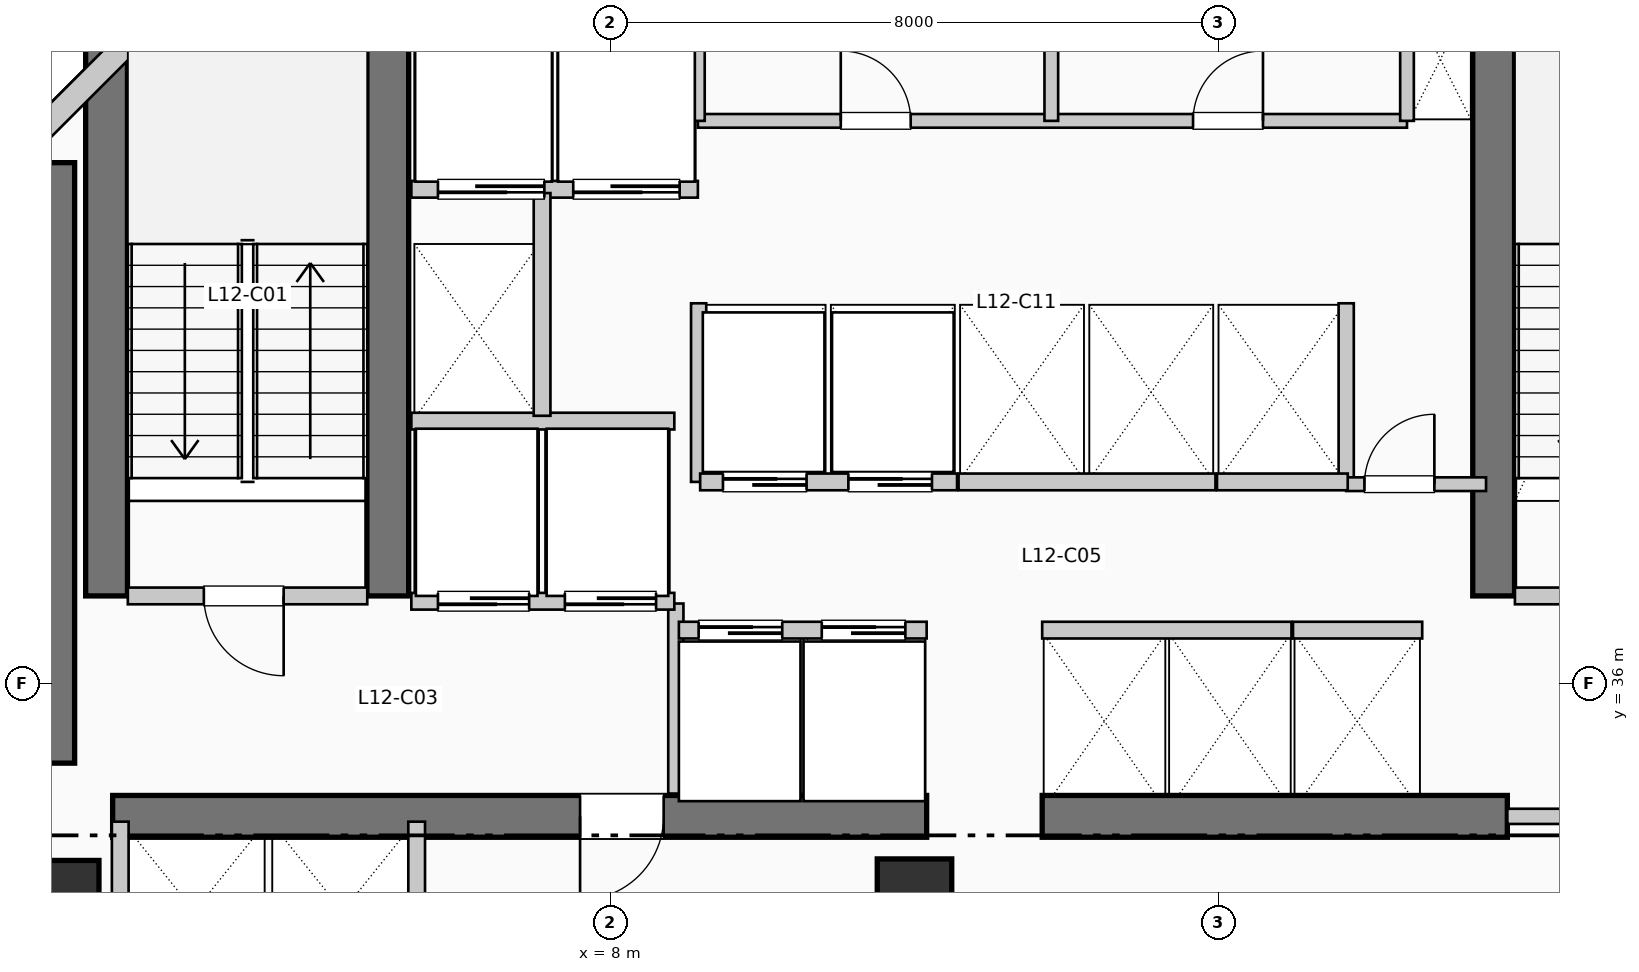
"""IFC4 building model, lengths in metres.
Left out: names, types, materials, properties, quantities, classifications, styles, units other than length and angle.
Written with IfcOpenShell. Run it as: python <this file> out.ifc"""

import sys

from ifc_helpers import new_model, si_unit, direction, frame, frame_2d, origin, origin_2d, place, context, subcontext, project, spatial, rectangle, extrude, element, fill, save


model = new_model("IFC4")
c1 = context("Model", 3, precision=1e-05, world=origin(), true_north=direction((0.0, 1.0)))
c2 = subcontext(c1, "Body", "Model", "MODEL_VIEW")
j1 = project(units=[si_unit("LENGTHUNIT", "METRE"), si_unit("PLANEANGLEUNIT", "RADIAN")], contexts=[c1])
p1 = place(None, origin())
s1 = spatial("IfcSite", under=j1, at=p1, CompositionType="ELEMENT")
p2 = place(p1, origin())
s2 = spatial("IfcBuilding", under=s1, at=p2, CompositionType="ELEMENT")
p3 = place(p2, frame((0.0, 0.0, 54.12)))
s3 = spatial("IfcBuildingStorey", under=s2, at=p3, CompositionType="ELEMENT", Elevation=54.12)
p4 = place(p3, frame((0.5, 34.95, 0.0), z_axis=(0.0, 0.0, 1.0), x_axis=(0.0, 1.0, 0.0)))
e1 = element("IfcWall", 1, at=p4, inside=s3, PredefinedType="SHEAR", context=c2, shape_type="SweptSolid", body=[
    extrude(rectangle(XDim=7.9, YDim=0.9, at=frame_2d((3.95, 0.0))), origin(), (0.0, 0.0, 1.0), 3.96),
])
p5 = place(p3, frame((1.45, 34.25, 0.0), z_axis=(0.0, 0.0, 1.0), x_axis=(1.0, 0.0, 0.0)))
e2 = element("IfcWall", 2, at=p5, inside=s3, PredefinedType="SHEAR", context=c2, shape_type="SweptSolid", body=[
    extrude(rectangle(XDim=10.71, YDim=0.55, at=frame_2d((5.355, 0.0))), origin(), (0.0, 0.0, 1.0), 3.96),
])
p6 = place(p5, frame((7.25, 0.0, 0.0), z_axis=(0.0, 0.0, 1.0), x_axis=(-1.0, 0.0, 0.0)))
e3 = element("IfcOpeningElement", 3, at=p6, cuts=e2, PredefinedType="OPENING", context=c2, shape_type="SweptSolid", body=[
    extrude(rectangle(XDim=1.1, YDim=2.15, at=frame_2d((0.55, 1.075))), frame((0.0, 0.285, 0.0), z_axis=(0.0, -1.0, 0.0), x_axis=(1.0, 0.0, 0.0)), (0.0, 0.0, 1.0), 0.57),
])
p7 = place(p3, frame((13.68, 34.25, 0.0), z_axis=(0.0, 0.0, 1.0), x_axis=(1.0, 0.0, 0.0)))
e4 = element("IfcWall", 4, at=p7, inside=s3, PredefinedType="SHEAR", context=c2, shape_type="SweptSolid", body=[
    extrude(rectangle(XDim=6.12, YDim=0.55, at=frame_2d((3.06, 0.0))), origin(), (0.0, 0.0, 1.0), 3.96),
])
for number, where, z_axis, x_axis in (
    (5, (1.37, 37.15, 0.0), (0.0, 0.0, 1.0), (0.0, 1.0, 0.0)),
    (6, (5.07, 37.15, 0.0), (0.0, 0.0, 1.0), (0.0, 1.0, 0.0)),
    (7, (19.62, 37.15, 0.0), (0.0, 0.0, 1.0), (0.0, 1.0, 0.0)),
):
    element("IfcWall", number, at=place(p3, frame(where, z_axis=z_axis, x_axis=x_axis)), inside=s3, PredefinedType="SHEAR", context=c2, shape_type="SweptSolid", body=[
        extrude(rectangle(XDim=7.89, YDim=0.55, at=frame_2d((3.945, 0.0))), origin(), (0.0, 0.0, 1.0), 3.96),
    ])
p8 = place(p3, frame((0.8, 33.2, 0.0), z_axis=(0.0, 0.0, 1.0), x_axis=(1.0, 0.0, 0.0)))
e8 = element("IfcColumn", 8, at=p8, inside=s3, PredefinedType="COLUMN", context=c2, shape_type="SweptSolid", body=[
    extrude(rectangle(XDim=0.94, YDim=0.94, at=origin_2d()), origin(), (0.0, 0.0, 1.0), 3.96),
])
p9 = place(p3, frame((12.0, 33.2, 0.0), z_axis=(0.0, 0.0, 1.0), x_axis=(1.0, 0.0, 0.0)))
e9 = element("IfcColumn", 9, at=p9, inside=s3, PredefinedType="COLUMN", context=c2, shape_type="SweptSolid", body=[
    extrude(rectangle(XDim=0.98, YDim=0.98, at=origin_2d()), origin(), (0.0, 0.0, 1.0), 3.96),
])
p10 = place(p3, frame((3.074, 45.848, 0.0), z_axis=(0.0, 0.0, 1.0), x_axis=(-0.707106781187, -0.707106781187, 0.0)))
e10 = element("IfcWall", 10, at=p10, inside=s3, PredefinedType="SOLIDWALL", context=c2, shape_type="SweptSolid", body=[
    extrude(rectangle(XDim=4.133, YDim=0.32, at=frame_2d((2.066, 0.0))), origin(), (0.0, 0.0, 1.0), 3.71),
])
p11 = place(p3, frame((1.65, 37.15, 0.0), z_axis=(0.0, 0.0, 1.0), x_axis=(1.0, 0.0, 0.0)))
e11 = element("IfcWall", 11, at=p11, inside=s3, PredefinedType="PARTITIONING", context=c2, shape_type="SweptSolid", body=[
    extrude(rectangle(XDim=3.15, YDim=0.22, at=frame_2d((1.575, 0.0))), origin(), (0.0, 0.0, 1.0), 3.71),
])
p12 = place(p11, frame((2.05, 0.0, 0.0), z_axis=(0.0, 0.0, 1.0), x_axis=(-1.0, 0.0, 0.0)))
e12 = element("IfcOpeningElement", 12, at=p12, cuts=e11, PredefinedType="OPENING", context=c2, shape_type="SweptSolid", body=[
    extrude(rectangle(XDim=1.05, YDim=2.15, at=frame_2d((0.525, 1.075))), frame((0.0, 0.12, 0.0), z_axis=(0.0, -1.0, 0.0), x_axis=(1.0, 0.0, 0.0)), (0.0, 0.0, 1.0), 0.24),
])
p13 = place(p3, frame((8.86, 34.55, 0.0), z_axis=(0.0, 0.0, 1.0), x_axis=(0.0, 1.0, 0.0)))
e13 = element("IfcWall", 13, at=p13, inside=s3, PredefinedType="PARTITIONING", context=c2, shape_type="SweptSolid", body=[
    extrude(rectangle(XDim=2.5, YDim=0.2, at=frame_2d((1.25, 0.0))), origin(), (0.0, 0.0, 1.0), 3.71),
])
p14 = place(p3, frame((19.9, 37.15, 0.0), z_axis=(0.0, 0.0, 1.0), x_axis=(1.0, 0.0, 0.0)))
e14 = element("IfcWall", 14, at=p14, inside=s3, PredefinedType="PARTITIONING", context=c2, shape_type="SweptSolid", body=[
    extrude(rectangle(XDim=3.15, YDim=0.22, at=frame_2d((1.575, 0.0))), origin(), (0.0, 0.0, 1.0), 3.71),
])
p15 = place(p14, frame((2.05, 0.0, 0.0), z_axis=(0.0, 0.0, 1.0), x_axis=(-1.0, 0.0, 0.0)))
e15 = element("IfcOpeningElement", 15, at=p15, cuts=e14, PredefinedType="OPENING", context=c2, shape_type="SweptSolid", body=[
    extrude(rectangle(XDim=1.05, YDim=2.15, at=frame_2d((0.525, 1.075))), frame((0.0, 0.12, 0.0), z_axis=(0.0, -1.0, 0.0), x_axis=(1.0, 0.0, 0.0)), (0.0, 0.0, 1.0), 0.24),
])
p16 = place(p3, frame((19.8, 34.25, 0.0), z_axis=(0.0, 0.0, 1.0), x_axis=(1.0, 0.0, 0.0)))
e16 = element("IfcWall", 16, at=p16, inside=s3, PredefinedType="PARTITIONING", context=c2, shape_type="SweptSolid", body=[
    extrude(rectangle(XDim=3.25, YDim=0.2, at=frame_2d((1.625, 0.0))), origin(), (0.0, 0.0, 1.0), 3.71),
])
p17 = place(p16, frame((2.15, 0.0, 0.0), z_axis=(0.0, 0.0, 1.0), x_axis=(-1.0, 0.0, 0.0)))
e17 = element("IfcOpeningElement", 17, at=p17, cuts=e16, PredefinedType="OPENING", context=c2, shape_type="SweptSolid", body=[
    extrude(rectangle(XDim=1.1, YDim=2.15, at=frame_2d((0.55, 1.075))), frame((0.0, 0.11, 0.0), z_axis=(0.0, -1.0, 0.0), x_axis=(1.0, 0.0, 0.0)), (0.0, 0.0, 1.0), 0.22),
])
p18 = place(p3, frame((5.38, 37.08, 0.0), z_axis=(0.0, 0.0, 1.0), x_axis=(1.0, 0.0, 0.0)))
e18 = element("IfcWall", 18, at=p18, inside=s3, PredefinedType="PARTITIONING", context=c2, shape_type="SweptSolid", body=[
    extrude(rectangle(XDim=3.46, YDim=0.22, at=frame_2d((1.73, 0.0))), origin(), (0.0, 0.0, 1.0), 3.71),
])
p19 = place(p18, frame((1.55, 0.0, 0.0), z_axis=(0.0, 0.0, 1.0), x_axis=(-1.0, 0.0, 0.0)))
e19 = element("IfcOpeningElement", 19, at=p19, cuts=e18, PredefinedType="OPENING", context=c2, shape_type="SweptSolid", body=[
    extrude(rectangle(XDim=1.2, YDim=2.2, at=frame_2d((0.6, 1.1))), frame((0.0, 0.12, 0.0), z_axis=(0.0, -1.0, 0.0), x_axis=(1.0, 0.0, 0.0)), (0.0, 0.0, 1.0), 0.24),
])
p20 = place(p18, frame((3.22, 0.0, 0.0), z_axis=(0.0, 0.0, 1.0), x_axis=(-1.0, 0.0, 0.0)))
e20 = element("IfcOpeningElement", 20, at=p20, cuts=e18, PredefinedType="OPENING", context=c2, shape_type="SweptSolid", body=[
    extrude(rectangle(XDim=1.2, YDim=2.2, at=frame_2d((0.6, 1.1))), frame((0.0, 0.12, 0.0), z_axis=(0.0, -1.0, 0.0), x_axis=(1.0, 0.0, 0.0)), (0.0, 0.0, 1.0), 0.24),
])
p21 = place(p3, frame((5.38, 39.45, 0.0), z_axis=(0.0, 0.0, 1.0), x_axis=(1.0, 0.0, 0.0)))
e21 = element("IfcWall", 21, at=p21, inside=s3, PredefinedType="PARTITIONING", context=c2, shape_type="SweptSolid", body=[
    extrude(rectangle(XDim=3.46, YDim=0.22, at=frame_2d((1.73, 0.0))), origin(), (0.0, 0.0, 1.0), 3.71),
])
p22 = place(p3, frame((5.38, 42.5, 0.0), z_axis=(0.0, 0.0, 1.0), x_axis=(1.0, 0.0, 0.0)))
e22 = element("IfcWall", 22, at=p22, inside=s3, PredefinedType="PARTITIONING", context=c2, shape_type="SweptSolid", body=[
    extrude(rectangle(XDim=3.77, YDim=0.22, at=frame_2d((1.885, 0.0))), origin(), (0.0, 0.0, 1.0), 3.71),
])
p23 = place(p22, frame((1.75, 0.0, 0.0), z_axis=(0.0, 0.0, 1.0), x_axis=(-1.0, 0.0, 0.0)))
e23 = element("IfcOpeningElement", 23, at=p23, cuts=e22, PredefinedType="OPENING", context=c2, shape_type="SweptSolid", body=[
    extrude(rectangle(XDim=1.4, YDim=2.2, at=frame_2d((0.7, 1.1))), frame((0.0, 0.12, 0.0), z_axis=(0.0, -1.0, 0.0), x_axis=(1.0, 0.0, 0.0)), (0.0, 0.0, 1.0), 0.24),
])
p24 = place(p22, frame((3.53, 0.0, 0.0), z_axis=(0.0, 0.0, 1.0), x_axis=(-1.0, 0.0, 0.0)))
e24 = element("IfcOpeningElement", 24, at=p24, cuts=e22, PredefinedType="OPENING", context=c2, shape_type="SweptSolid", body=[
    extrude(rectangle(XDim=1.4, YDim=2.2, at=frame_2d((0.7, 1.1))), frame((0.0, 0.12, 0.0), z_axis=(0.0, -1.0, 0.0), x_axis=(1.0, 0.0, 0.0)), (0.0, 0.0, 1.0), 0.24),
])
p25 = place(p3, frame((7.1, 39.52, 0.0), z_axis=(0.0, 0.0, 1.0), x_axis=(0.0, 1.0, 0.0)))
e25 = element("IfcWall", 25, at=p25, inside=s3, PredefinedType="PARTITIONING", context=c2, shape_type="SweptSolid", body=[
    extrude(rectangle(XDim=2.93, YDim=0.22, at=frame_2d((1.465, 0.0))), origin(), (0.0, 0.0, 1.0), 3.71),
])
for number, where, z_axis, x_axis in (
    (26, (1.55, 31.8, 0.0), (0.0, 0.0, 1.0), (0.0, 1.0, 0.0)),
    (27, (5.45, 31.8, 0.0), (0.0, 0.0, 1.0), (0.0, 1.0, 0.0)),
):
    element("IfcWall", number, at=place(p3, frame(where, z_axis=z_axis, x_axis=x_axis)), inside=s3, PredefinedType="PARTITIONING", context=c2, shape_type="SweptSolid", body=[
        extrude(rectangle(XDim=2.38, YDim=0.22, at=frame_2d((1.19, 0.0))), origin(), (0.0, 0.0, 1.0), 3.71),
    ])
for number, where, z_axis, x_axis in (
    (28, (9.16, 38.65, 0.0), (0.0, 0.0, 1.0), (0.0, 1.0, 0.0)),
    (29, (17.68, 38.65, 0.0), (0.0, 0.0, 1.0), (0.0, 1.0, 0.0)),
):
    element("IfcWall", number, at=place(p3, frame(where, z_axis=z_axis, x_axis=x_axis)), inside=s3, PredefinedType="PARTITIONING", context=c2, shape_type="SweptSolid", body=[
        extrude(rectangle(XDim=2.35, YDim=0.2, at=frame_2d((1.175, 0.0))), origin(), (0.0, 0.0, 1.0), 3.71),
    ])
p26 = place(p3, frame((17.68, 38.62, 0.0), z_axis=(0.0, 0.0, 1.0), x_axis=(1.0, 0.0, 0.0)))
e30 = element("IfcWall", 30, at=p26, inside=s3, PredefinedType="PARTITIONING", context=c2, shape_type="SweptSolid", body=[
    extrude(rectangle(XDim=1.84, YDim=0.18, at=frame_2d((0.92, 0.0))), origin(), (0.0, 0.0, 1.0), 3.71),
])
p27 = place(p26, frame((0.24, 0.0, 0.0)))
e31 = element("IfcOpeningElement", 31, at=p27, cuts=e30, PredefinedType="OPENING", context=c2, shape_type="SweptSolid", body=[
    extrude(rectangle(XDim=0.92, YDim=2.1, at=frame_2d((0.46, 1.05))), frame((0.0, 0.1, 0.0), z_axis=(0.0, -1.0, 0.0), x_axis=(1.0, 0.0, 0.0)), (0.0, 0.0, 1.0), 0.2),
])
p28 = place(p3, frame((8.9, 36.7, 0.0), z_axis=(0.0, 0.0, 1.0), x_axis=(1.0, 0.0, 0.0)))
e32 = element("IfcWall", 32, at=p28, inside=s3, PredefinedType="PARTITIONING", context=c2, shape_type="SweptSolid", body=[
    extrude(rectangle(XDim=3.26, YDim=0.22, at=frame_2d((1.63, 0.0))), origin(), (0.0, 0.0, 1.0), 3.71),
])
p29 = place(p28, frame((0.26, 0.0, 0.0)))
e33 = element("IfcOpeningElement", 33, at=p29, cuts=e32, PredefinedType="OPENING", context=c2, shape_type="SweptSolid", body=[
    extrude(rectangle(XDim=1.1, YDim=2.2, at=frame_2d((0.55, 1.1))), frame((0.0, 0.12, 0.0), z_axis=(0.0, -1.0, 0.0), x_axis=(1.0, 0.0, 0.0)), (0.0, 0.0, 1.0), 0.24),
])
p30 = place(p28, frame((1.88, 0.0, 0.0)))
e34 = element("IfcOpeningElement", 34, at=p30, cuts=e32, PredefinedType="OPENING", context=c2, shape_type="SweptSolid", body=[
    extrude(rectangle(XDim=1.1, YDim=2.2, at=frame_2d((0.55, 1.1))), frame((0.0, 0.12, 0.0), z_axis=(0.0, -1.0, 0.0), x_axis=(1.0, 0.0, 0.0)), (0.0, 0.0, 1.0), 0.24),
])
p31 = place(p3, frame((9.18, 38.65, 0.0), z_axis=(0.0, 0.0, 1.0), x_axis=(1.0, 0.0, 0.0)))
e35 = element("IfcWall", 35, at=p31, inside=s3, PredefinedType="PARTITIONING", context=c2, shape_type="SweptSolid", body=[
    extrude(rectangle(XDim=3.38, YDim=0.22, at=frame_2d((1.69, 0.0))), origin(), (0.0, 0.0, 1.0), 3.71),
])
p32 = place(p31, frame((0.3, 0.0, 0.0)))
e36 = element("IfcOpeningElement", 36, at=p32, cuts=e35, PredefinedType="OPENING", context=c2, shape_type="SweptSolid", body=[
    extrude(rectangle(XDim=1.1, YDim=2.2, at=frame_2d((0.55, 1.1))), frame((0.0, 0.12, 0.0), z_axis=(0.0, -1.0, 0.0), x_axis=(1.0, 0.0, 0.0)), (0.0, 0.0, 1.0), 0.24),
])
p33 = place(p31, frame((1.95, 0.0, 0.0)))
e37 = element("IfcOpeningElement", 37, at=p33, cuts=e35, PredefinedType="OPENING", context=c2, shape_type="SweptSolid", body=[
    extrude(rectangle(XDim=1.1, YDim=2.2, at=frame_2d((0.55, 1.1))), frame((0.0, 0.12, 0.0), z_axis=(0.0, -1.0, 0.0), x_axis=(1.0, 0.0, 0.0)), (0.0, 0.0, 1.0), 0.24),
])
p34 = place(p3, frame((13.68, 36.7, 0.0), z_axis=(0.0, 0.0, 1.0), x_axis=(1.0, 0.0, 0.0)))
e38 = element("IfcWall", 38, at=p34, inside=s3, PredefinedType="PARTITIONING", context=c2, shape_type="SweptSolid", body=[
    extrude(rectangle(XDim=3.28, YDim=0.22, at=frame_2d((1.64, 0.0))), origin(), (0.0, 0.0, 1.0), 3.71),
])
p35 = place(p3, frame((12.58, 38.65, 0.0), z_axis=(0.0, 0.0, 1.0), x_axis=(1.0, 0.0, 0.0)))
e39 = element("IfcWall", 39, at=p35, inside=s3, PredefinedType="PARTITIONING", context=c2, shape_type="SweptSolid", body=[
    extrude(rectangle(XDim=3.38, YDim=0.22, at=frame_2d((1.69, 0.0))), origin(), (0.0, 0.0, 1.0), 3.71),
])
p36 = place(p3, frame((16.98, 36.7, 0.0), z_axis=(0.0, 0.0, 1.0), x_axis=(1.0, 0.0, 0.0)))
e40 = element("IfcWall", 40, at=p36, inside=s3, PredefinedType="PARTITIONING", context=c2, shape_type="SweptSolid", body=[
    extrude(rectangle(XDim=1.7, YDim=0.22, at=frame_2d((0.85, 0.0))), origin(), (0.0, 0.0, 1.0), 3.71),
])
p37 = place(p3, frame((15.98, 38.65, 0.0), z_axis=(0.0, 0.0, 1.0), x_axis=(1.0, 0.0, 0.0)))
e41 = element("IfcWall", 41, at=p37, inside=s3, PredefinedType="PARTITIONING", context=c2, shape_type="SweptSolid", body=[
    extrude(rectangle(XDim=1.72, YDim=0.22, at=frame_2d((0.86, 0.0))), origin(), (0.0, 0.0, 1.0), 3.71),
])
p38 = place(p3, frame((9.15, 43.4, 0.0), z_axis=(0.0, 0.0, 1.0), x_axis=(1.0, 0.0, 0.0)))
e42 = element("IfcWall", 42, at=p38, inside=s3, PredefinedType="PLUMBINGWALL", context=c2, shape_type="SweptSolid", body=[
    extrude(rectangle(XDim=9.33, YDim=0.18, at=frame_2d((4.665, 0.0))), origin(), (0.0, 0.0, 1.0), 3.71),
])
p39 = place(p38, frame((1.88, 0.0, 0.0)))
e43 = element("IfcOpeningElement", 43, at=p39, cuts=e42, PredefinedType="OPENING", context=c2, shape_type="SweptSolid", body=[
    extrude(rectangle(XDim=0.92, YDim=2.1, at=frame_2d((0.46, 1.05))), frame((0.0, 0.1, 0.0), z_axis=(0.0, -1.0, 0.0), x_axis=(1.0, 0.0, 0.0)), (0.0, 0.0, 1.0), 0.2),
])
p40 = place(p38, frame((6.515, 0.0, 0.0)))
e44 = element("IfcOpeningElement", 44, at=p40, cuts=e42, PredefinedType="OPENING", context=c2, shape_type="SweptSolid", body=[
    extrude(rectangle(XDim=0.92, YDim=2.1, at=frame_2d((0.46, 1.05))), frame((0.0, 0.1, 0.0), z_axis=(0.0, -1.0, 0.0), x_axis=(1.0, 0.0, 0.0)), (0.0, 0.0, 1.0), 0.2),
])
for number, where, z_axis, x_axis in (
    (45, (9.15, 43.4, 0.0), (0.0, 0.0, 1.0), (0.0, 1.0, 0.0)),
    (46, (18.48, 43.4, 0.0), (0.0, 0.0, 1.0), (0.0, 1.0, 0.0)),
    (47, (13.8, 43.4, 0.0), (0.0, 0.0, 1.0), (0.0, 1.0, 0.0)),
):
    element("IfcWall", number, at=place(p3, frame(where, z_axis=z_axis, x_axis=x_axis)), inside=s3, PredefinedType="PLUMBINGWALL", context=c2, shape_type="SweptSolid", body=[
        extrude(rectangle(XDim=1.88, YDim=0.18, at=frame_2d((0.94, 0.0))), origin(), (0.0, 0.0, 1.0), 3.71),
    ])
p41 = place(p12, origin())
e48 = element("IfcDoor", 48, at=p41, inside=s3, OperationType="SINGLE_SWING_RIGHT", PredefinedType="DOOR", context=c2, shape_type="SweptSolid", body=[
    extrude(rectangle(XDim=1.05, YDim=2.15, at=frame_2d((0.525, 1.075))), frame((0.0, 0.025, 0.0), z_axis=(0.0, -1.0, 0.0), x_axis=(1.0, 0.0, 0.0)), (0.0, 0.0, 1.0), 0.05),
])
fill(e12, e48)
p42 = place(p6, origin())
e49 = element("IfcDoor", 49, at=p42, inside=s3, OperationType="SINGLE_SWING_LEFT", PredefinedType="DOOR", context=c2, shape_type="SweptSolid", body=[
    extrude(rectangle(XDim=1.1, YDim=2.15, at=frame_2d((0.55, 1.075))), frame((0.0, 0.025, 0.0), z_axis=(0.0, -1.0, 0.0), x_axis=(1.0, 0.0, 0.0)), (0.0, 0.0, 1.0), 0.05),
])
fill(e3, e49)
p43 = place(p19, origin())
e50 = element("IfcDoor", 50, at=p43, inside=s3, OperationType="SLIDING_TO_RIGHT", PredefinedType="DOOR", context=c2, shape_type="SweptSolid", body=[
    extrude(rectangle(XDim=1.2, YDim=2.2, at=frame_2d((0.6, 1.1))), frame((0.0, 0.025, 0.0), z_axis=(0.0, -1.0, 0.0), x_axis=(1.0, 0.0, 0.0)), (0.0, 0.0, 1.0), 0.05),
])
fill(e19, e50)
p44 = place(p20, origin())
e51 = element("IfcDoor", 51, at=p44, inside=s3, OperationType="SLIDING_TO_RIGHT", PredefinedType="DOOR", context=c2, shape_type="SweptSolid", body=[
    extrude(rectangle(XDim=1.2, YDim=2.2, at=frame_2d((0.6, 1.1))), frame((0.0, 0.025, 0.0), z_axis=(0.0, -1.0, 0.0), x_axis=(1.0, 0.0, 0.0)), (0.0, 0.0, 1.0), 0.05),
])
fill(e20, e51)
p45 = place(p23, origin())
e52 = element("IfcDoor", 52, at=p45, inside=s3, OperationType="SLIDING_TO_LEFT", PredefinedType="DOOR", context=c2, shape_type="SweptSolid", body=[
    extrude(rectangle(XDim=1.4, YDim=2.2, at=frame_2d((0.7, 1.1))), frame((0.0, 0.025, 0.0), z_axis=(0.0, -1.0, 0.0), x_axis=(1.0, 0.0, 0.0)), (0.0, 0.0, 1.0), 0.05),
])
fill(e23, e52)
p46 = place(p24, origin())
e53 = element("IfcDoor", 53, at=p46, inside=s3, OperationType="SLIDING_TO_LEFT", PredefinedType="DOOR", context=c2, shape_type="SweptSolid", body=[
    extrude(rectangle(XDim=1.4, YDim=2.2, at=frame_2d((0.7, 1.1))), frame((0.0, 0.025, 0.0), z_axis=(0.0, -1.0, 0.0), x_axis=(1.0, 0.0, 0.0)), (0.0, 0.0, 1.0), 0.05),
])
fill(e24, e53)
p47 = place(p27, origin())
e54 = element("IfcDoor", 54, at=p47, inside=s3, OperationType="SINGLE_SWING_RIGHT", PredefinedType="DOOR", context=c2, shape_type="SweptSolid", body=[
    extrude(rectangle(XDim=0.92, YDim=2.1, at=frame_2d((0.46, 1.05))), frame((0.0, 0.025, 0.0), z_axis=(0.0, -1.0, 0.0), x_axis=(1.0, 0.0, 0.0)), (0.0, 0.0, 1.0), 0.05),
])
fill(e31, e54)
p48 = place(p29, origin())
e55 = element("IfcDoor", 55, at=p48, inside=s3, OperationType="SLIDING_TO_LEFT", PredefinedType="DOOR", context=c2, shape_type="SweptSolid", body=[
    extrude(rectangle(XDim=1.1, YDim=2.2, at=frame_2d((0.55, 1.1))), frame((0.0, 0.025, 0.0), z_axis=(0.0, -1.0, 0.0), x_axis=(1.0, 0.0, 0.0)), (0.0, 0.0, 1.0), 0.05),
])
fill(e33, e55)
p49 = place(p30, origin())
e56 = element("IfcDoor", 56, at=p49, inside=s3, OperationType="SLIDING_TO_LEFT", PredefinedType="DOOR", context=c2, shape_type="SweptSolid", body=[
    extrude(rectangle(XDim=1.1, YDim=2.2, at=frame_2d((0.55, 1.1))), frame((0.0, 0.025, 0.0), z_axis=(0.0, -1.0, 0.0), x_axis=(1.0, 0.0, 0.0)), (0.0, 0.0, 1.0), 0.05),
])
fill(e34, e56)
p50 = place(p32, origin())
e57 = element("IfcDoor", 57, at=p50, inside=s3, OperationType="SLIDING_TO_LEFT", PredefinedType="DOOR", context=c2, shape_type="SweptSolid", body=[
    extrude(rectangle(XDim=1.1, YDim=2.2, at=frame_2d((0.55, 1.1))), frame((0.0, 0.025, 0.0), z_axis=(0.0, -1.0, 0.0), x_axis=(1.0, 0.0, 0.0)), (0.0, 0.0, 1.0), 0.05),
])
fill(e36, e57)
p51 = place(p33, origin())
e58 = element("IfcDoor", 58, at=p51, inside=s3, OperationType="SLIDING_TO_LEFT", PredefinedType="DOOR", context=c2, shape_type="SweptSolid", body=[
    extrude(rectangle(XDim=1.1, YDim=2.2, at=frame_2d((0.55, 1.1))), frame((0.0, 0.025, 0.0), z_axis=(0.0, -1.0, 0.0), x_axis=(1.0, 0.0, 0.0)), (0.0, 0.0, 1.0), 0.05),
])
fill(e37, e58)
p52 = place(p39, origin())
e59 = element("IfcDoor", 59, at=p52, inside=s3, OperationType="SINGLE_SWING_LEFT", PredefinedType="DOOR", context=c2, shape_type="SweptSolid", body=[
    extrude(rectangle(XDim=0.92, YDim=2.1, at=frame_2d((0.46, 1.05))), frame((0.0, 0.025, 0.0), z_axis=(0.0, -1.0, 0.0), x_axis=(1.0, 0.0, 0.0)), (0.0, 0.0, 1.0), 0.05),
])
fill(e43, e59)
p53 = place(p40, origin())
e60 = element("IfcDoor", 60, at=p53, inside=s3, OperationType="SINGLE_SWING_RIGHT", PredefinedType="DOOR", context=c2, shape_type="SweptSolid", body=[
    extrude(rectangle(XDim=0.92, YDim=2.1, at=frame_2d((0.46, 1.05))), frame((0.0, 0.025, 0.0), z_axis=(0.0, -1.0, 0.0), x_axis=(1.0, 0.0, 0.0)), (0.0, 0.0, 1.0), 0.05),
])
fill(e44, e60)
save(model, sys.argv[1])
